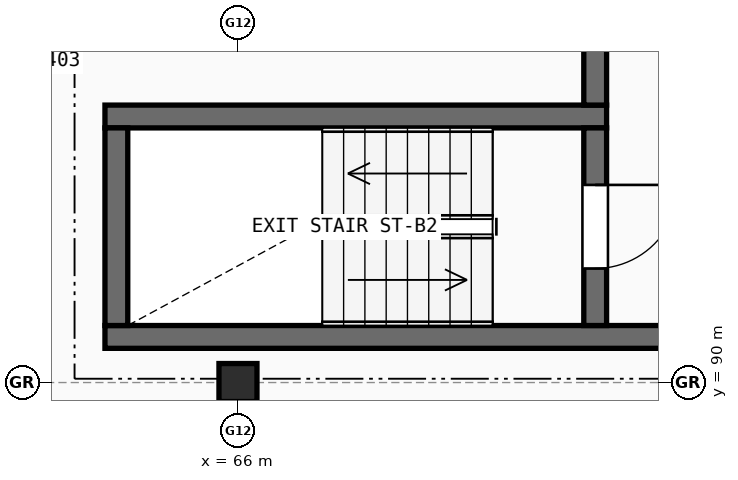
"""IFC4 building model, lengths in metres.
Left out: names, types, materials, properties, quantities, classifications, styles, units other than length and angle.
Written with IfcOpenShell. Run it as: python <this file> out.ifc"""

import sys

from ifc_helpers import new_model, si_unit, direction, frame, frame_2d, origin, origin_2d, place, context, subcontext, project, spatial, rectangle, extrude, element, fill, save


model = new_model("IFC4")
c1 = context("Model", 3, precision=1e-05, world=origin(), true_north=direction((0.0, 1.0)))
c2 = subcontext(c1, "Body", "Model", "MODEL_VIEW")
j1 = project(units=[si_unit("LENGTHUNIT", "METRE"), si_unit("PLANEANGLEUNIT", "RADIAN")], contexts=[c1])
p1 = place(None, origin())
s1 = spatial("IfcSite", under=j1, at=p1, CompositionType="ELEMENT")
p2 = place(p1, origin())
s2 = spatial("IfcBuilding", under=s1, at=p2, CompositionType="ELEMENT")
p3 = place(p2, frame((0.0, 0.0, 26.9)))
s3 = spatial("IfcBuildingStorey", under=s2, at=p3, CompositionType="ELEMENT", Elevation=26.9)
p4 = place(p3, frame((66.0, 90.0, 0.0), z_axis=(0.0, 0.0, 1.0), x_axis=(1.0, 0.0, 0.0)))
e1 = element("IfcColumn", 1, at=p4, inside=s3, PredefinedType="COLUMN", context=c2, shape_type="SweptSolid", body=[
    extrude(rectangle(XDim=0.5, YDim=0.5, at=origin_2d()), origin(), (0.0, 0.0, 1.0), 2.98),
])
p5 = place(p3, frame((64.25, 90.6, 0.0), z_axis=(0.0, 0.0, 1.0), x_axis=(1.0, 0.0, 0.0)))
e2 = element("IfcWall", 2, at=p5, inside=s3, PredefinedType="SHEAR", context=c2, shape_type="SweptSolid", body=[
    extrude(rectangle(XDim=11.35, YDim=0.3, at=frame_2d((5.675, 0.0))), origin(), (0.0, 0.0, 1.0), 2.98),
])
p6 = place(p5, frame((8.1, 0.0, 0.0)))
e3 = element("IfcOpeningElement", 3, at=p6, cuts=e2, PredefinedType="OPENING", context=c2, shape_type="SweptSolid", body=[
    extrude(rectangle(XDim=1.2, YDim=2.15, at=frame_2d((0.6, 1.075))), frame((0.0, 0.16, 0.0), z_axis=(0.0, -1.0, 0.0), x_axis=(1.0, 0.0, 0.0)), (0.0, 0.0, 1.0), 0.32),
])
p7 = place(p3, frame((70.85, 93.5, 0.0), z_axis=(0.0, 0.0, 1.0), x_axis=(-1.0, 0.0, 0.0)))
e4 = element("IfcWall", 4, at=p7, inside=s3, PredefinedType="SHEAR", context=c2, shape_type="SweptSolid", body=[
    extrude(rectangle(XDim=6.6, YDim=0.3, at=frame_2d((3.3, 0.0))), origin(), (0.0, 0.0, 1.0), 2.98),
])
p8 = place(p3, frame((64.4, 93.35, 0.0), z_axis=(0.0, 0.0, 1.0), x_axis=(0.0, -1.0, 0.0)))
e5 = element("IfcWall", 5, at=p8, inside=s3, PredefinedType="SHEAR", context=c2, shape_type="SweptSolid", body=[
    extrude(rectangle(XDim=2.6, YDim=0.3, at=frame_2d((1.3, 0.0))), origin(), (0.0, 0.0, 1.0), 2.98),
])
p9 = place(p3, frame((70.7, 90.75, 0.0), z_axis=(0.0, 0.0, 1.0), x_axis=(0.0, 1.0, 0.0)))
e6 = element("IfcWall", 6, at=p9, inside=s3, PredefinedType="SHEAR", context=c2, shape_type="SweptSolid", body=[
    extrude(rectangle(XDim=2.6, YDim=0.3, at=frame_2d((1.3, 0.0))), origin(), (0.0, 0.0, 1.0), 2.98),
])
p10 = place(p9, frame((0.75, 0.0, 0.0)))
e7 = element("IfcOpeningElement", 7, at=p10, cuts=e6, PredefinedType="OPENING", context=c2, shape_type="SweptSolid", body=[
    extrude(rectangle(XDim=1.1, YDim=2.15, at=frame_2d((0.55, 1.075))), frame((0.0, 0.16, 0.0), z_axis=(0.0, -1.0, 0.0), x_axis=(1.0, 0.0, 0.0)), (0.0, 0.0, 1.0), 0.32),
])
p11 = place(p3, frame((70.7, 93.65, 0.0), z_axis=(0.0, 0.0, 1.0), x_axis=(0.0, 1.0, 0.0)))
e8 = element("IfcWall", 8, at=p11, inside=s3, PredefinedType="SHEAR", context=c2, shape_type="SweptSolid", body=[
    extrude(rectangle(XDim=3.55, YDim=0.3, at=frame_2d((1.775, 0.0))), origin(), (0.0, 0.0, 1.0), 2.98),
])
p12 = place(p10, origin())
e9 = element("IfcDoor", 9, at=p12, inside=s3, OperationType="SINGLE_SWING_RIGHT", PredefinedType="DOOR", context=c2, shape_type="SweptSolid", body=[
    extrude(rectangle(XDim=1.1, YDim=2.15, at=frame_2d((0.55, 1.075))), frame((0.0, 0.025, 0.0), z_axis=(0.0, -1.0, 0.0), x_axis=(1.0, 0.0, 0.0)), (0.0, 0.0, 1.0), 0.05),
])
fill(e7, e9)
save(model, sys.argv[1])
